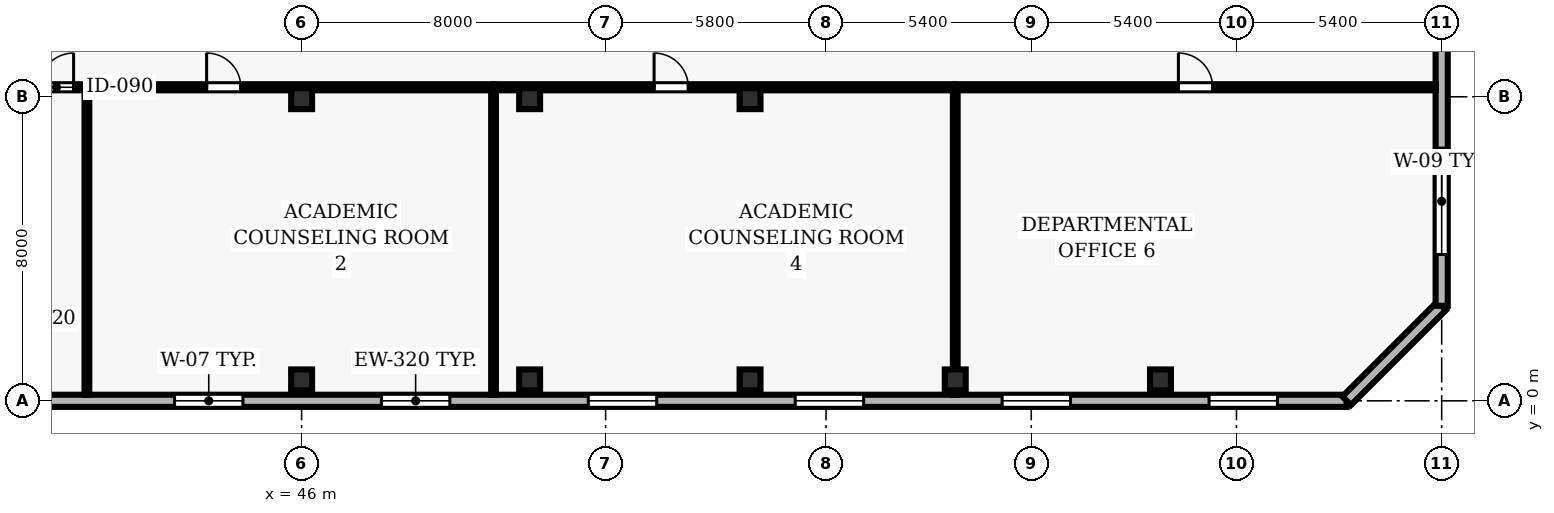
"""IFC4 building model, lengths in metres.
Left out: names, types, materials, properties, quantities, classifications, styles, units other than length and angle.
Written with IfcOpenShell. Run it as: python <this file> out.ifc"""

import sys

from ifc_helpers import new_model, si_unit, direction, frame, frame_2d, origin, origin_2d, place, context, subcontext, project, spatial, rectangle, hollow_rectangle, extrude, element, fill, save


model = new_model("IFC4")
c1 = context("Model", 3, precision=1e-05, world=origin(), true_north=direction((0.0, 1.0)))
c2 = subcontext(c1, "Body", "Model", "MODEL_VIEW")
j1 = project(units=[si_unit("LENGTHUNIT", "METRE"), si_unit("PLANEANGLEUNIT", "RADIAN")], contexts=[c1])
p1 = place(None, origin())
s1 = spatial("IfcSite", under=j1, at=p1, CompositionType="ELEMENT")
p2 = place(p1, origin())
s2 = spatial("IfcBuilding", under=s1, at=p2, CompositionType="ELEMENT")
p3 = place(p2, frame((0.0, 0.0, 77.8)))
s3 = spatial("IfcBuildingStorey", under=s2, at=p3, CompositionType="ELEMENT", Elevation=77.8)
for number, where, z_axis, x_axis in (
    (1, (46.0, 0.55, 0.0), (0.0, 0.0, 1.0), (1.0, 0.0, 0.0)),
    (2, (46.0, 7.95, 0.0), (0.0, 0.0, 1.0), (1.0, 0.0, 0.0)),
    (3, (52.0, 0.55, 0.0), (0.0, 0.0, 1.0), (1.0, 0.0, 0.0)),
    (4, (52.0, 7.95, 0.0), (0.0, 0.0, 1.0), (1.0, 0.0, 0.0)),
    (5, (57.8, 0.55, 0.0), (0.0, 0.0, 1.0), (1.0, 0.0, 0.0)),
    (6, (57.8, 7.95, 0.0), (0.0, 0.0, 1.0), (1.0, 0.0, 0.0)),
    (7, (63.2, 0.55, 0.0), (0.0, 0.0, 1.0), (1.0, 0.0, 0.0)),
    (8, (68.6, 0.55, 0.0), (0.0, 0.0, 1.0), (1.0, 0.0, 0.0)),
):
    element("IfcColumn", number, at=place(p3, frame(where, z_axis=z_axis, x_axis=x_axis)), inside=s3, PredefinedType="COLUMN", context=c2, shape_type="SweptSolid", body=[
        extrude(hollow_rectangle(XDim=0.55, YDim=0.55, WallThickness=0.025, at=origin_2d()), origin(), (0.0, 0.0, 1.0), 3.9),
    ])
p4 = place(p3, frame((24.5, 0.0, 0.0), z_axis=(0.0, 0.0, 1.0), x_axis=(1.0, 0.0, 0.0)))
e9 = element("IfcWall", 9, at=p4, inside=s3, PredefinedType="SOLIDWALL", context=c2, shape_type="SweptSolid", body=[
    extrude(rectangle(XDim=49.0, YDim=0.32, at=frame_2d((24.5, 0.0))), origin(), (0.0, 0.0, 1.0), 3.69),
])
p5 = place(p4, frame((1.822, 0.0, 0.9)))
e10 = element("IfcOpeningElement", 10, at=p5, cuts=e9, PredefinedType="OPENING", context=c2, shape_type="SweptSolid", body=[
    extrude(rectangle(XDim=1.8, YDim=1.8, at=frame_2d((0.9, 0.9))), frame((0.0, 0.17, 0.0), z_axis=(0.0, -1.0, 0.0), x_axis=(1.0, 0.0, 0.0)), (0.0, 0.0, 1.0), 0.34),
])
p6 = place(p4, frame((18.156, 0.0, 0.9)))
e11 = element("IfcOpeningElement", 11, at=p6, cuts=e9, PredefinedType="OPENING", context=c2, shape_type="SweptSolid", body=[
    extrude(rectangle(XDim=1.8, YDim=1.8, at=frame_2d((0.9, 0.9))), frame((0.0, 0.17, 0.0), z_axis=(0.0, -1.0, 0.0), x_axis=(1.0, 0.0, 0.0)), (0.0, 0.0, 1.0), 0.34),
])
p7 = place(p4, frame((23.6, 0.0, 0.9)))
e12 = element("IfcOpeningElement", 12, at=p7, cuts=e9, PredefinedType="OPENING", context=c2, shape_type="SweptSolid", body=[
    extrude(rectangle(XDim=1.8, YDim=1.8, at=frame_2d((0.9, 0.9))), frame((0.0, 0.17, 0.0), z_axis=(0.0, -1.0, 0.0), x_axis=(1.0, 0.0, 0.0)), (0.0, 0.0, 1.0), 0.34),
])
p8 = place(p4, frame((29.044, 0.0, 0.9)))
e13 = element("IfcOpeningElement", 13, at=p8, cuts=e9, PredefinedType="OPENING", context=c2, shape_type="SweptSolid", body=[
    extrude(rectangle(XDim=1.8, YDim=1.8, at=frame_2d((0.9, 0.9))), frame((0.0, 0.17, 0.0), z_axis=(0.0, -1.0, 0.0), x_axis=(1.0, 0.0, 0.0)), (0.0, 0.0, 1.0), 0.34),
])
p9 = place(p4, frame((34.489, 0.0, 0.9)))
e14 = element("IfcOpeningElement", 14, at=p9, cuts=e9, PredefinedType="OPENING", context=c2, shape_type="SweptSolid", body=[
    extrude(rectangle(XDim=1.8, YDim=1.8, at=frame_2d((0.9, 0.9))), frame((0.0, 0.17, 0.0), z_axis=(0.0, -1.0, 0.0), x_axis=(1.0, 0.0, 0.0)), (0.0, 0.0, 1.0), 0.34),
])
p10 = place(p4, frame((39.933, 0.0, 0.9)))
e15 = element("IfcOpeningElement", 15, at=p10, cuts=e9, PredefinedType="OPENING", context=c2, shape_type="SweptSolid", body=[
    extrude(rectangle(XDim=1.8, YDim=1.8, at=frame_2d((0.9, 0.9))), frame((0.0, 0.17, 0.0), z_axis=(0.0, -1.0, 0.0), x_axis=(1.0, 0.0, 0.0)), (0.0, 0.0, 1.0), 0.34),
])
p11 = place(p4, frame((45.378, 0.0, 0.9)))
e16 = element("IfcOpeningElement", 16, at=p11, cuts=e9, PredefinedType="OPENING", context=c2, shape_type="SweptSolid", body=[
    extrude(rectangle(XDim=1.8, YDim=1.8, at=frame_2d((0.9, 0.9))), frame((0.0, 0.17, 0.0), z_axis=(0.0, -1.0, 0.0), x_axis=(1.0, 0.0, 0.0)), (0.0, 0.0, 1.0), 0.34),
])
p12 = place(p3, frame((73.5, 0.0, 0.0), z_axis=(0.0, 0.0, 1.0), x_axis=(0.707106781187, 0.707106781187, 0.0)))
e17 = element("IfcWall", 17, at=p12, inside=s3, PredefinedType="SOLIDWALL", context=c2, shape_type="SweptSolid", body=[
    extrude(rectangle(XDim=3.536, YDim=0.32, at=frame_2d((1.768, 0.0))), origin(), (0.0, 0.0, 1.0), 3.69),
])
p13 = place(p3, frame((76.0, 2.5, 0.0), z_axis=(0.0, 0.0, 1.0), x_axis=(0.0, 1.0, 0.0)))
e18 = element("IfcWall", 18, at=p13, inside=s3, PredefinedType="SOLIDWALL", context=c2, shape_type="SweptSolid", body=[
    extrude(rectangle(XDim=11.0, YDim=0.32, at=frame_2d((5.5, 0.0))), origin(), (0.0, 0.0, 1.0), 3.69),
])
p14 = place(p13, frame((1.35, 0.0, 0.9)))
e19 = element("IfcOpeningElement", 19, at=p14, cuts=e18, PredefinedType="OPENING", context=c2, shape_type="SweptSolid", body=[
    extrude(rectangle(XDim=2.8, YDim=1.8, at=frame_2d((1.4, 0.9))), frame((0.0, 0.17, 0.0), z_axis=(0.0, -1.0, 0.0), x_axis=(1.0, 0.0, 0.0)), (0.0, 0.0, 1.0), 0.34),
])
p15 = place(p3, frame((38.05, 8.25, 0.0), z_axis=(0.0, 0.0, 1.0), x_axis=(1.0, 0.0, 0.0)))
e20 = element("IfcWall", 20, at=p15, inside=s3, PredefinedType="PARTITIONING", context=c2, shape_type="SweptSolid", body=[
    extrude(rectangle(XDim=2.3, YDim=0.16, at=frame_2d((1.15, 0.0))), origin(), (0.0, 0.0, 1.0), 2.995),
])
p16 = place(p15, frame((1.05, 0.0, 0.0)))
e21 = element("IfcOpeningElement", 21, at=p16, cuts=e20, PredefinedType="OPENING", context=c2, shape_type="SweptSolid", body=[
    extrude(rectangle(XDim=0.9, YDim=2.1, at=frame_2d((0.45, 1.05))), frame((0.0, 0.09, 0.0), z_axis=(0.0, -1.0, 0.0), x_axis=(1.0, 0.0, 0.0)), (0.0, 0.0, 1.0), 0.18),
])
p17 = place(p3, frame((40.35, 8.25, 0.0), z_axis=(0.0, 0.0, 1.0), x_axis=(1.0, 0.0, 0.0)))
e22 = element("IfcWall", 22, at=p17, inside=s3, PredefinedType="PARTITIONING", context=c2, shape_type="SweptSolid", body=[
    extrude(rectangle(XDim=10.7, YDim=0.16, at=frame_2d((5.35, 0.0))), origin(), (0.0, 0.0, 1.0), 2.995),
])
p18 = place(p17, frame((3.15, 0.0, 0.0)))
e23 = element("IfcOpeningElement", 23, at=p18, cuts=e22, PredefinedType="OPENING", context=c2, shape_type="SweptSolid", body=[
    extrude(rectangle(XDim=0.9, YDim=2.1, at=frame_2d((0.45, 1.05))), frame((0.0, 0.09, 0.0), z_axis=(0.0, -1.0, 0.0), x_axis=(1.0, 0.0, 0.0)), (0.0, 0.0, 1.0), 0.18),
])
p19 = place(p3, frame((51.05, 8.25, 0.0), z_axis=(0.0, 0.0, 1.0), x_axis=(1.0, 0.0, 0.0)))
e24 = element("IfcWall", 24, at=p19, inside=s3, PredefinedType="PARTITIONING", context=c2, shape_type="SweptSolid", body=[
    extrude(rectangle(XDim=12.15, YDim=0.16, at=frame_2d((6.075, 0.0))), origin(), (0.0, 0.0, 1.0), 2.995),
])
p20 = place(p19, frame((4.225, 0.0, 0.0)))
e25 = element("IfcOpeningElement", 25, at=p20, cuts=e24, PredefinedType="OPENING", context=c2, shape_type="SweptSolid", body=[
    extrude(rectangle(XDim=0.9, YDim=2.1, at=frame_2d((0.45, 1.05))), frame((0.0, 0.09, 0.0), z_axis=(0.0, -1.0, 0.0), x_axis=(1.0, 0.0, 0.0)), (0.0, 0.0, 1.0), 0.18),
])
p21 = place(p3, frame((63.2, 8.25, 0.0), z_axis=(0.0, 0.0, 1.0), x_axis=(1.0, 0.0, 0.0)))
e26 = element("IfcWall", 26, at=p21, inside=s3, PredefinedType="PARTITIONING", context=c2, shape_type="SweptSolid", body=[
    extrude(rectangle(XDim=12.645, YDim=0.16, at=frame_2d((6.323, 0.0))), origin(), (0.0, 0.0, 1.0), 3.69),
])
p22 = place(p21, frame((5.872, 0.0, 0.0)))
e27 = element("IfcOpeningElement", 27, at=p22, cuts=e26, PredefinedType="OPENING", context=c2, shape_type="SweptSolid", body=[
    extrude(rectangle(XDim=0.9, YDim=2.1, at=frame_2d((0.45, 1.05))), frame((0.0, 0.09, 0.0), z_axis=(0.0, -1.0, 0.0), x_axis=(1.0, 0.0, 0.0)), (0.0, 0.0, 1.0), 0.18),
])
for number, where, z_axis, x_axis in (
    (28, (40.35, 0.155, 0.0), (0.0, 0.0, 1.0), (0.0, 1.0, 0.0)),
    (29, (51.05, 0.155, 0.0), (0.0, 0.0, 1.0), (0.0, 1.0, 0.0)),
):
    element("IfcWall", number, at=place(p3, frame(where, z_axis=z_axis, x_axis=x_axis)), inside=s3, PredefinedType="PARTITIONING", context=c2, shape_type="SweptSolid", body=[
        extrude(rectangle(XDim=8.02, YDim=0.125, at=frame_2d((4.01, 0.0))), origin(), (0.0, 0.0, 1.0), 3.69),
    ])
p23 = place(p3, frame((63.2, 0.155, 0.0), z_axis=(0.0, 0.0, 1.0), x_axis=(0.0, 1.0, 0.0)))
e30 = element("IfcWall", 30, at=p23, inside=s3, PredefinedType="PARTITIONING", context=c2, shape_type="SweptSolid", body=[
    extrude(rectangle(XDim=8.02, YDim=0.125, at=frame_2d((4.01, 0.0))), origin(), (0.0, 0.0, 1.0), 2.995),
])
p24 = place(p6, origin())
e31 = element("IfcWindow", 31, at=p24, inside=s3, PartitioningType="SINGLE_PANEL", PredefinedType="WINDOW", context=c2, shape_type="SweptSolid", body=[
    extrude(rectangle(XDim=1.8, YDim=1.8, at=frame_2d((0.9, 0.9))), frame((0.0, 0.03, 0.0), z_axis=(0.0, -1.0, 0.0), x_axis=(1.0, 0.0, 0.0)), (0.0, 0.0, 1.0), 0.06),
])
fill(e11, e31)
p25 = place(p7, origin())
e32 = element("IfcWindow", 32, at=p25, inside=s3, PartitioningType="SINGLE_PANEL", PredefinedType="WINDOW", context=c2, shape_type="SweptSolid", body=[
    extrude(rectangle(XDim=1.8, YDim=1.8, at=frame_2d((0.9, 0.9))), frame((0.0, 0.03, 0.0), z_axis=(0.0, -1.0, 0.0), x_axis=(1.0, 0.0, 0.0)), (0.0, 0.0, 1.0), 0.06),
])
fill(e12, e32)
p26 = place(p8, origin())
e33 = element("IfcWindow", 33, at=p26, inside=s3, PartitioningType="SINGLE_PANEL", PredefinedType="WINDOW", context=c2, shape_type="SweptSolid", body=[
    extrude(rectangle(XDim=1.8, YDim=1.8, at=frame_2d((0.9, 0.9))), frame((0.0, 0.03, 0.0), z_axis=(0.0, -1.0, 0.0), x_axis=(1.0, 0.0, 0.0)), (0.0, 0.0, 1.0), 0.06),
])
fill(e13, e33)
p27 = place(p9, origin())
e34 = element("IfcWindow", 34, at=p27, inside=s3, PartitioningType="SINGLE_PANEL", PredefinedType="WINDOW", context=c2, shape_type="SweptSolid", body=[
    extrude(rectangle(XDim=1.8, YDim=1.8, at=frame_2d((0.9, 0.9))), frame((0.0, 0.03, 0.0), z_axis=(0.0, -1.0, 0.0), x_axis=(1.0, 0.0, 0.0)), (0.0, 0.0, 1.0), 0.06),
])
fill(e14, e34)
p28 = place(p10, origin())
e35 = element("IfcWindow", 35, at=p28, inside=s3, PartitioningType="SINGLE_PANEL", PredefinedType="WINDOW", context=c2, shape_type="SweptSolid", body=[
    extrude(rectangle(XDim=1.8, YDim=1.8, at=frame_2d((0.9, 0.9))), frame((0.0, 0.03, 0.0), z_axis=(0.0, -1.0, 0.0), x_axis=(1.0, 0.0, 0.0)), (0.0, 0.0, 1.0), 0.06),
])
fill(e15, e35)
p29 = place(p11, origin())
e36 = element("IfcWindow", 36, at=p29, inside=s3, PartitioningType="SINGLE_PANEL", PredefinedType="WINDOW", context=c2, shape_type="SweptSolid", body=[
    extrude(rectangle(XDim=1.8, YDim=1.8, at=frame_2d((0.9, 0.9))), frame((0.0, 0.03, 0.0), z_axis=(0.0, -1.0, 0.0), x_axis=(1.0, 0.0, 0.0)), (0.0, 0.0, 1.0), 0.06),
])
fill(e16, e36)
p30 = place(p14, origin())
e37 = element("IfcWindow", 37, at=p30, inside=s3, PartitioningType="SINGLE_PANEL", PredefinedType="WINDOW", context=c2, shape_type="SweptSolid", body=[
    extrude(rectangle(XDim=2.8, YDim=1.8, at=frame_2d((1.4, 0.9))), frame((0.0, 0.03, 0.0), z_axis=(0.0, -1.0, 0.0), x_axis=(1.0, 0.0, 0.0)), (0.0, 0.0, 1.0), 0.06),
])
fill(e19, e37)
p31 = place(p16, origin())
e38 = element("IfcDoor", 38, at=p31, inside=s3, OperationType="SINGLE_SWING_RIGHT", PredefinedType="DOOR", context=c2, shape_type="SweptSolid", body=[
    extrude(rectangle(XDim=0.9, YDim=2.1, at=frame_2d((0.45, 1.05))), frame((0.0, 0.025, 0.0), z_axis=(0.0, -1.0, 0.0), x_axis=(1.0, 0.0, 0.0)), (0.0, 0.0, 1.0), 0.05),
])
fill(e21, e38)
p32 = place(p18, origin())
e39 = element("IfcDoor", 39, at=p32, inside=s3, OperationType="SINGLE_SWING_LEFT", PredefinedType="DOOR", context=c2, shape_type="SweptSolid", body=[
    extrude(rectangle(XDim=0.9, YDim=2.1, at=frame_2d((0.45, 1.05))), frame((0.0, 0.025, 0.0), z_axis=(0.0, -1.0, 0.0), x_axis=(1.0, 0.0, 0.0)), (0.0, 0.0, 1.0), 0.05),
])
fill(e23, e39)
p33 = place(p20, origin())
e40 = element("IfcDoor", 40, at=p33, inside=s3, OperationType="SINGLE_SWING_LEFT", PredefinedType="DOOR", context=c2, shape_type="SweptSolid", body=[
    extrude(rectangle(XDim=0.9, YDim=2.1, at=frame_2d((0.45, 1.05))), frame((0.0, 0.025, 0.0), z_axis=(0.0, -1.0, 0.0), x_axis=(1.0, 0.0, 0.0)), (0.0, 0.0, 1.0), 0.05),
])
fill(e25, e40)
p34 = place(p22, origin())
e41 = element("IfcDoor", 41, at=p34, inside=s3, OperationType="SINGLE_SWING_LEFT", PredefinedType="DOOR", context=c2, shape_type="SweptSolid", body=[
    extrude(rectangle(XDim=0.9, YDim=2.1, at=frame_2d((0.45, 1.05))), frame((0.0, 0.025, 0.0), z_axis=(0.0, -1.0, 0.0), x_axis=(1.0, 0.0, 0.0)), (0.0, 0.0, 1.0), 0.05),
])
fill(e27, e41)
save(model, sys.argv[1])
